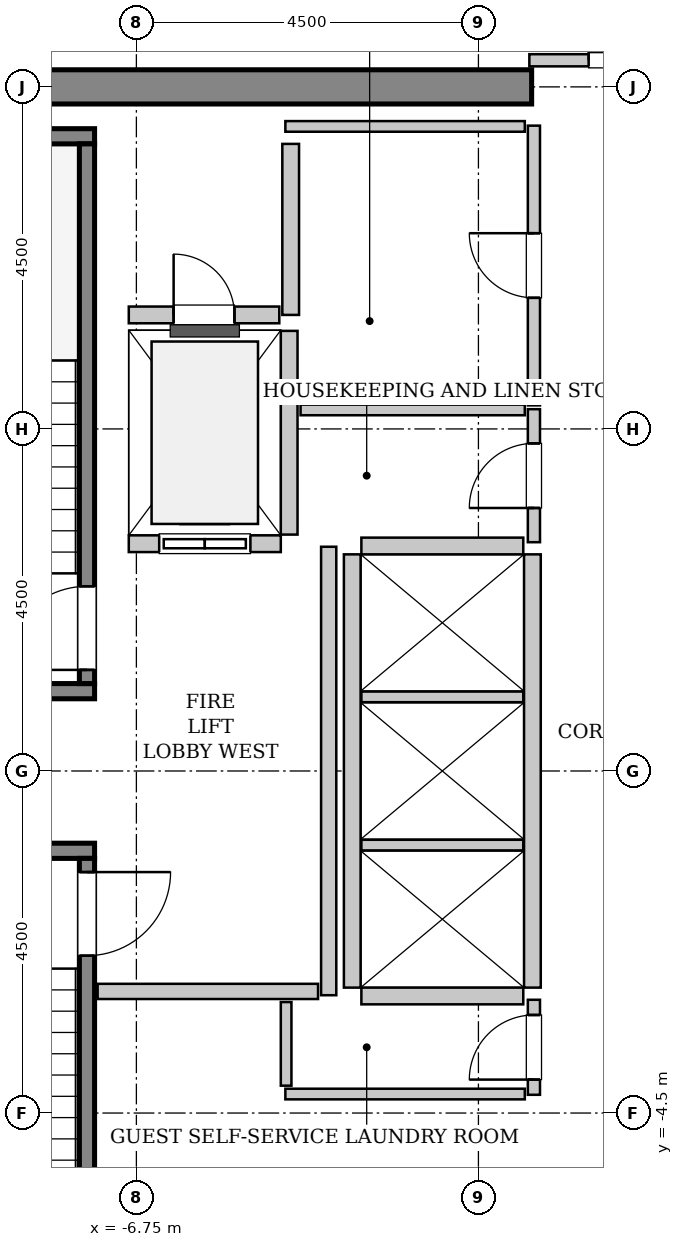
"""IFC4 building model, lengths in metres.
Left out: names, types, materials, properties, quantities, classifications, styles, units other than length and angle.
Written with IfcOpenShell. Run it as: python <this file> out.ifc"""

import sys

from ifc_helpers import new_model, si_unit, direction, frame, frame_2d, origin, place, context, subcontext, project, spatial, rectangle, extrude, source, transform, mapped, element, fill, save


model = new_model("IFC4")
c1 = context("Model", 3, precision=1e-05, world=origin(), true_north=direction((0.0, 1.0)))
c2 = subcontext(c1, "Body", "Model", "MODEL_VIEW")
j1 = project(units=[si_unit("LENGTHUNIT", "METRE"), si_unit("PLANEANGLEUNIT", "RADIAN")], contexts=[c1])
p1 = place(None, origin())
s1 = spatial("IfcSite", under=j1, at=p1, CompositionType="ELEMENT")
p2 = place(p1, origin())
s2 = spatial("IfcBuilding", under=s1, at=p2, CompositionType="ELEMENT")
p3 = place(p2, frame((0.0, 0.0, 237.0)))
s3 = spatial("IfcBuildingStorey", under=s2, at=p3, CompositionType="ELEMENT", Elevation=237.0)
m1 = source(origin(), c2, "Body", "SweptSolid", [
    extrude(rectangle(XDim=9.925, YDim=0.45, at=frame_2d((4.962, 0.0))), origin(), (0.0, 0.0, 1.0), 3.8),
])
p4 = place(p3, frame((-11.475, 9.0, 0.0), z_axis=(0.0, 0.0, 1.0), x_axis=(1.0, 0.0, 0.0)))
e1 = element("IfcWall", 1, at=p4, inside=s3, PredefinedType="SHEAR", context=c2, shape_type="MappedRepresentation", body=[
    mapped(m1, transform((0.0, 0.0, 0.0), x_axis=(1.0, 0.0, 0.0), y_axis=(0.0, 1.0, 0.0), z_axis=(0.0, 0.0, 1.0), scale=1.0)),
])
m2 = source(origin(), c2, "Body", "SweptSolid", [
    extrude(rectangle(XDim=3.4, YDim=0.2, at=frame_2d((1.7, 0.0))), origin(), (0.0, 0.0, 1.0), 3.8),
])
p5 = place(p3, frame((-7.3, 1.05, 0.0), z_axis=(0.0, 0.0, 1.0), x_axis=(-1.0, 0.0, 0.0)))
e2 = element("IfcWall", 2, at=p5, inside=s3, PredefinedType="SOLIDWALL", context=c2, shape_type="MappedRepresentation", body=[
    mapped(m2, transform((0.0, 0.0, 0.0), x_axis=(1.0, 0.0, 0.0), y_axis=(0.0, 1.0, 0.0), z_axis=(0.0, 0.0, 1.0), scale=1.0)),
])
m3 = source(origin(), c2, "Body", "SweptSolid", [
    extrude(rectangle(XDim=3.73, YDim=0.2, at=frame_2d((1.865, 0.0))), origin(), (0.0, 0.0, 1.0), 3.8),
])
p6 = place(p3, frame((-7.3, 8.35, 0.0), z_axis=(0.0, 0.0, 1.0), x_axis=(-1.0, 0.0, 0.0)))
e3 = element("IfcWall", 3, at=p6, inside=s3, PredefinedType="SOLIDWALL", context=c2, shape_type="MappedRepresentation", body=[
    mapped(m3, transform((0.0, 0.0, 0.0), x_axis=(1.0, 0.0, 0.0), y_axis=(0.0, 1.0, 0.0), z_axis=(0.0, 0.0, 1.0), scale=1.0)),
])
m4 = source(origin(), c2, "Body", "SweptSolid", [
    extrude(rectangle(XDim=7.1, YDim=0.2, at=frame_2d((3.55, 0.0))), origin(), (0.0, 0.0, 1.0), 3.8),
])
p7 = place(p3, frame((-7.4, 1.15, 0.0), z_axis=(0.0, 0.0, 1.0), x_axis=(0.0, 1.0, 0.0)))
e4 = element("IfcWall", 4, at=p7, inside=s3, PredefinedType="SOLIDWALL", context=c2, shape_type="MappedRepresentation", body=[
    mapped(m4, transform((0.0, 0.0, 0.0), x_axis=(1.0, 0.0, 0.0), y_axis=(0.0, 1.0, 0.0), z_axis=(0.0, 0.0, 1.0), scale=1.0)),
])
p8 = place(p7, frame((0.18, 0.0, 0.0)))
e5 = element("IfcOpeningElement", 5, at=p8, cuts=e4, PredefinedType="OPENING", context=c2, shape_type="SweptSolid", body=[
    extrude(rectangle(XDim=1.1, YDim=2.15, at=frame_2d((0.55, 1.075))), frame((0.0, 0.11, 0.0), z_axis=(0.0, -1.0, 0.0), x_axis=(1.0, 0.0, 0.0)), (0.0, 0.0, 1.0), 0.22),
])
p9 = place(p3, frame((-10.7, -1.05, 0.0), z_axis=(0.0, 0.0, 1.0), x_axis=(1.0, 0.0, 0.0)))
e6 = element("IfcWall", 6, at=p9, inside=s3, PredefinedType="SOLIDWALL", context=c2, shape_type="MappedRepresentation", body=[
    mapped(m2, transform((0.0, 0.0, 0.0), x_axis=(1.0, 0.0, 0.0), y_axis=(0.0, 1.0, 0.0), z_axis=(0.0, 0.0, 1.0), scale=1.0)),
])
p10 = place(p3, frame((-7.4, -1.15, 0.0), z_axis=(0.0, 0.0, 1.0), x_axis=(0.0, -1.0, 0.0)))
e7 = element("IfcWall", 7, at=p10, inside=s3, PredefinedType="SOLIDWALL", context=c2, shape_type="MappedRepresentation", body=[
    mapped(m4, transform((0.0, 0.0, 0.0), x_axis=(1.0, 0.0, 0.0), y_axis=(0.0, 1.0, 0.0), z_axis=(0.0, 0.0, 1.0), scale=1.0)),
])
p11 = place(p10, frame((0.18, 0.0, 0.0)))
e8 = element("IfcOpeningElement", 8, at=p11, cuts=e7, PredefinedType="OPENING", context=c2, shape_type="SweptSolid", body=[
    extrude(rectangle(XDim=1.1, YDim=2.15, at=frame_2d((0.55, 1.075))), frame((0.0, 0.11, 0.0), z_axis=(0.0, -1.0, 0.0), x_axis=(1.0, 0.0, 0.0)), (0.0, 0.0, 1.0), 0.22),
])
m5 = source(origin(), c2, "Body", "SweptSolid", [
    extrude(rectangle(XDim=2.0, YDim=0.22, at=frame_2d((1.0, 0.0))), origin(), (0.0, 0.0, 1.0), 3.535),
])
p12 = place(p3, frame((-6.85, 2.99, 0.0), z_axis=(0.0, 0.0, 1.0), x_axis=(1.0, 0.0, 0.0)))
e9 = element("IfcWall", 9, at=p12, inside=s3, PredefinedType="SOLIDWALL", context=c2, shape_type="MappedRepresentation", body=[
    mapped(m5, transform((0.0, 0.0, 0.0), x_axis=(1.0, 0.0, 0.0), y_axis=(0.0, 1.0, 0.0), z_axis=(0.0, 0.0, 1.0), scale=1.0)),
])
p13 = place(p12, frame((0.4, 0.0, 0.0)))
e10 = element("IfcOpeningElement", 10, at=p13, cuts=e9, PredefinedType="OPENING", context=c2, shape_type="SweptSolid", body=[
    extrude(rectangle(XDim=1.2, YDim=2.2, at=frame_2d((0.6, 1.1))), frame((0.0, 0.12, 0.0), z_axis=(0.0, -1.0, 0.0), x_axis=(1.0, 0.0, 0.0)), (0.0, 0.0, 1.0), 0.24),
])
m6 = source(origin(), c2, "Body", "SweptSolid", [
    extrude(rectangle(XDim=2.68, YDim=0.22, at=frame_2d((1.34, 0.0))), origin(), (0.0, 0.0, 1.0), 3.535),
])
p14 = place(p3, frame((-4.74, 3.11, 0.0), z_axis=(0.0, 0.0, 1.0), x_axis=(0.0, 1.0, 0.0)))
e11 = element("IfcWall", 11, at=p14, inside=s3, PredefinedType="SOLIDWALL", context=c2, shape_type="MappedRepresentation", body=[
    mapped(m6, transform((0.0, 0.0, 0.0), x_axis=(1.0, 0.0, 0.0), y_axis=(0.0, 1.0, 0.0), z_axis=(0.0, 0.0, 1.0), scale=1.0)),
])
m7 = source(origin(), c2, "Body", "SweptSolid", [
    extrude(rectangle(XDim=5.7, YDim=0.22, at=frame_2d((2.85, 0.0))), origin(), (0.0, 0.0, 1.0), 3.535),
])
for number, where, z_axis, x_axis in (
    (12, (-1.54, -2.85, 0.0), (0.0, 0.0, 1.0), (0.0, 1.0, 0.0)),
    (13, (-3.91, 2.85, 0.0), (0.0, 0.0, 1.0), (0.0, -1.0, 0.0)),
):
    element("IfcWall", number, at=place(p3, frame(where, z_axis=z_axis, x_axis=x_axis)), inside=s3, PredefinedType="SOLIDWALL", context=c2, shape_type="MappedRepresentation", body=[
        mapped(m7, transform((0.0, 0.0, 0.0), x_axis=(1.0, 0.0, 0.0), y_axis=(0.0, 1.0, 0.0), z_axis=(0.0, 0.0, 1.0), scale=1.0)),
    ])
m8 = source(origin(), c2, "Body", "SweptSolid", [
    extrude(rectangle(XDim=2.13, YDim=0.22, at=frame_2d((1.065, 0.0))), origin(), (0.0, 0.0, 1.0), 3.535),
])
p15 = place(p3, frame((-3.79, -2.96, 0.0), z_axis=(0.0, 0.0, 1.0), x_axis=(1.0, 0.0, 0.0)))
e14 = element("IfcWall", 14, at=p15, inside=s3, PredefinedType="SOLIDWALL", context=c2, shape_type="MappedRepresentation", body=[
    mapped(m8, transform((0.0, 0.0, 0.0), x_axis=(1.0, 0.0, 0.0), y_axis=(0.0, 1.0, 0.0), z_axis=(0.0, 0.0, 1.0), scale=1.0)),
])
m9 = source(origin(), c2, "Body", "SweptSolid", [
    extrude(rectangle(XDim=2.13, YDim=0.14, at=frame_2d((1.065, 0.0))), origin(), (0.0, 0.0, 1.0), 3.535),
])
for number, where, z_axis, x_axis in (
    (15, (-3.79, -0.975, 0.0), (0.0, 0.0, 1.0), (1.0, 0.0, 0.0)),
    (16, (-3.79, 0.975, 0.0), (0.0, 0.0, 1.0), (1.0, 0.0, 0.0)),
):
    element("IfcWall", number, at=place(p3, frame(where, z_axis=z_axis, x_axis=x_axis)), inside=s3, PredefinedType="PARTITIONING", context=c2, shape_type="MappedRepresentation", body=[
        mapped(m9, transform((0.0, 0.0, 0.0), x_axis=(1.0, 0.0, 0.0), y_axis=(0.0, 1.0, 0.0), z_axis=(0.0, 0.0, 1.0), scale=1.0)),
    ])
p16 = place(p3, frame((-1.66, 2.96, 0.0), z_axis=(0.0, 0.0, 1.0), x_axis=(-1.0, 0.0, 0.0)))
e17 = element("IfcWall", 17, at=p16, inside=s3, PredefinedType="SOLIDWALL", context=c2, shape_type="MappedRepresentation", body=[
    mapped(m8, transform((0.0, 0.0, 0.0), x_axis=(1.0, 0.0, 0.0), y_axis=(0.0, 1.0, 0.0), z_axis=(0.0, 0.0, 1.0), scale=1.0)),
])
m10 = source(origin(), c2, "Body", "SweptSolid", [
    extrude(rectangle(XDim=2.25, YDim=0.22, at=frame_2d((1.125, 0.0))), origin(), (0.0, 0.0, 1.0), 3.535),
])
p17 = place(p3, frame((-4.72, 6.0, 0.0), z_axis=(0.0, 0.0, 1.0), x_axis=(0.0, 1.0, 0.0)))
e18 = element("IfcWall", 18, at=p17, inside=s3, PredefinedType="SOLIDWALL", context=c2, shape_type="MappedRepresentation", body=[
    mapped(m10, transform((0.0, 0.0, 0.0), x_axis=(1.0, 0.0, 0.0), y_axis=(0.0, 1.0, 0.0), z_axis=(0.0, 0.0, 1.0), scale=1.0)),
])
m11 = source(origin(), c2, "Body", "SweptSolid", [
    extrude(rectangle(XDim=1.98, YDim=0.22, at=frame_2d((0.99, 0.0))), origin(), (0.0, 0.0, 1.0), 3.535),
])
p18 = place(p3, frame((-6.85, 6.0, 0.0), z_axis=(0.0, 0.0, 1.0), x_axis=(1.0, 0.0, 0.0)))
e19 = element("IfcWall", 19, at=p18, inside=s3, PredefinedType="SOLIDWALL", context=c2, shape_type="MappedRepresentation", body=[
    mapped(m11, transform((0.0, 0.0, 0.0), x_axis=(1.0, 0.0, 0.0), y_axis=(0.0, 1.0, 0.0), z_axis=(0.0, 0.0, 1.0), scale=1.0)),
])
p19 = place(p18, frame((0.59, 0.0, 0.0)))
e20 = element("IfcOpeningElement", 20, at=p19, cuts=e19, PredefinedType="OPENING", context=c2, shape_type="SweptSolid", body=[
    extrude(rectangle(XDim=0.8, YDim=2.0, at=frame_2d((0.4, 1.0))), frame((0.0, 0.12, 0.0), z_axis=(0.0, -1.0, 0.0), x_axis=(1.0, 0.0, 0.0)), (0.0, 0.0, 1.0), 0.24),
])
m12 = source(origin(), c2, "Body", "SweptSolid", [
    extrude(rectangle(XDim=5.9, YDim=0.2, at=frame_2d((2.95, 0.0))), origin(), (0.0, 0.0, 1.0), 3.535),
])
p20 = place(p3, frame((-4.22, -2.95, 0.0), z_axis=(0.0, 0.0, 1.0), x_axis=(0.0, 1.0, 0.0)))
e21 = element("IfcWall", 21, at=p20, inside=s3, PredefinedType="PARTITIONING", context=c2, shape_type="MappedRepresentation", body=[
    mapped(m12, transform((0.0, 0.0, 0.0), x_axis=(1.0, 0.0, 0.0), y_axis=(0.0, 1.0, 0.0), z_axis=(0.0, 0.0, 1.0), scale=1.0)),
])
m13 = source(origin(), c2, "Body", "SweptSolid", [
    extrude(rectangle(XDim=2.9, YDim=0.2, at=frame_2d((1.45, 0.0))), origin(), (0.0, 0.0, 1.0), 3.535),
])
p21 = place(p3, frame((-7.26, -2.9, 0.0), z_axis=(0.0, 0.0, 1.0), x_axis=(1.0, 0.0, 0.0)))
e22 = element("IfcWall", 22, at=p21, inside=s3, PredefinedType="PARTITIONING", context=c2, shape_type="MappedRepresentation", body=[
    mapped(m13, transform((0.0, 0.0, 0.0), x_axis=(1.0, 0.0, 0.0), y_axis=(0.0, 1.0, 0.0), z_axis=(0.0, 0.0, 1.0), scale=1.0)),
])
m14 = source(origin(), c2, "Body", "SweptSolid", [
    extrude(rectangle(XDim=3.16, YDim=0.16, at=frame_2d((1.58, 0.0))), origin(), (0.0, 0.0, 1.0), 2.625),
])
p22 = place(p3, frame((-1.58, 9.35, 0.0), z_axis=(0.0, 0.0, 1.0), x_axis=(1.0, 0.0, 0.0)))
e23 = element("IfcWall", 23, at=p22, inside=s3, PredefinedType="PARTITIONING", context=c2, shape_type="MappedRepresentation", body=[
    mapped(m14, transform((0.0, 0.0, 0.0), x_axis=(1.0, 0.0, 0.0), y_axis=(0.0, 1.0, 0.0), z_axis=(0.0, 0.0, 1.0), scale=1.0)),
])
p23 = place(p22, frame((0.78, 0.0, 0.0)))
e24 = element("IfcOpeningElement", 24, at=p23, cuts=e23, PredefinedType="OPENING", context=c2, shape_type="SweptSolid", body=[
    extrude(rectangle(XDim=1.6, YDim=2.3, at=frame_2d((0.8, 1.15))), frame((0.0, 0.09, 0.0), z_axis=(0.0, -1.0, 0.0), x_axis=(1.0, 0.0, 0.0)), (0.0, 0.0, 1.0), 0.18),
])
m15 = source(origin(), c2, "Body", "SweptSolid", [
    extrude(rectangle(XDim=1.75, YDim=0.16, at=frame_2d((0.875, 0.0))), origin(), (0.0, 0.0, 1.0), 3.535),
])
p24 = place(p3, frame((-1.52, 3.01, 0.0), z_axis=(0.0, 0.0, 1.0), x_axis=(0.0, 1.0, 0.0)))
e25 = element("IfcWall", 25, at=p24, inside=s3, PredefinedType="PARTITIONING", context=c2, shape_type="MappedRepresentation", body=[
    mapped(m15, transform((0.0, 0.0, 0.0), x_axis=(1.0, 0.0, 0.0), y_axis=(0.0, 1.0, 0.0), z_axis=(0.0, 0.0, 1.0), scale=1.0)),
])
p25 = place(p24, frame((0.45, 0.0, 0.0)))
e26 = element("IfcOpeningElement", 26, at=p25, cuts=e25, PredefinedType="OPENING", context=c2, shape_type="SweptSolid", body=[
    extrude(rectangle(XDim=0.85, YDim=2.1, at=frame_2d((0.425, 1.05))), frame((0.0, 0.09, 0.0), z_axis=(0.0, -1.0, 0.0), x_axis=(1.0, 0.0, 0.0)), (0.0, 0.0, 1.0), 0.18),
])
m16 = source(origin(), c2, "Body", "SweptSolid", [
    extrude(rectangle(XDim=2.95, YDim=0.14, at=frame_2d((1.475, 0.0))), origin(), (0.0, 0.0, 1.0), 3.535),
])
p26 = place(p3, frame((-4.59, 4.75, 0.0), z_axis=(0.0, 0.0, 1.0), x_axis=(1.0, 0.0, 0.0)))
e27 = element("IfcWall", 27, at=p26, inside=s3, PredefinedType="PARTITIONING", context=c2, shape_type="MappedRepresentation", body=[
    mapped(m16, transform((0.0, 0.0, 0.0), x_axis=(1.0, 0.0, 0.0), y_axis=(0.0, 1.0, 0.0), z_axis=(0.0, 0.0, 1.0), scale=1.0)),
])
m17 = source(origin(), c2, "Body", "SweptSolid", [
    extrude(rectangle(XDim=3.68, YDim=0.16, at=frame_2d((1.84, 0.0))), origin(), (0.0, 0.0, 1.0), 3.535),
])
p27 = place(p3, frame((-1.52, 4.81, 0.0), z_axis=(0.0, 0.0, 1.0), x_axis=(0.0, 1.0, 0.0)))
e28 = element("IfcWall", 28, at=p27, inside=s3, PredefinedType="PARTITIONING", context=c2, shape_type="MappedRepresentation", body=[
    mapped(m17, transform((0.0, 0.0, 0.0), x_axis=(1.0, 0.0, 0.0), y_axis=(0.0, 1.0, 0.0), z_axis=(0.0, 0.0, 1.0), scale=1.0)),
])
p28 = place(p27, frame((1.415, 0.0, 0.0)))
e29 = element("IfcOpeningElement", 29, at=p28, cuts=e28, PredefinedType="OPENING", context=c2, shape_type="SweptSolid", body=[
    extrude(rectangle(XDim=0.85, YDim=2.1, at=frame_2d((0.425, 1.05))), frame((0.0, 0.09, 0.0), z_axis=(0.0, -1.0, 0.0), x_axis=(1.0, 0.0, 0.0)), (0.0, 0.0, 1.0), 0.18),
])
m18 = source(origin(), c2, "Body", "SweptSolid", [
    extrude(rectangle(XDim=3.15, YDim=0.14, at=frame_2d((1.575, 0.0))), origin(), (0.0, 0.0, 1.0), 3.535),
])
p29 = place(p3, frame((-4.79, 8.48, 0.0), z_axis=(0.0, 0.0, 1.0), x_axis=(1.0, 0.0, 0.0)))
e30 = element("IfcWall", 30, at=p29, inside=s3, PredefinedType="PARTITIONING", context=c2, shape_type="MappedRepresentation", body=[
    mapped(m18, transform((0.0, 0.0, 0.0), x_axis=(1.0, 0.0, 0.0), y_axis=(0.0, 1.0, 0.0), z_axis=(0.0, 0.0, 1.0), scale=1.0)),
])
m19 = source(origin(), c2, "Body", "SweptSolid", [
    extrude(rectangle(XDim=1.25, YDim=0.16, at=frame_2d((0.625, 0.0))), origin(), (0.0, 0.0, 1.0), 3.535),
])
p30 = place(p3, frame((-1.52, -4.26, 0.0), z_axis=(0.0, 0.0, 1.0), x_axis=(0.0, 1.0, 0.0)))
e31 = element("IfcWall", 31, at=p30, inside=s3, PredefinedType="PARTITIONING", context=c2, shape_type="MappedRepresentation", body=[
    mapped(m19, transform((0.0, 0.0, 0.0), x_axis=(1.0, 0.0, 0.0), y_axis=(0.0, 1.0, 0.0), z_axis=(0.0, 0.0, 1.0), scale=1.0)),
])
p31 = place(p30, frame((0.2, 0.0, 0.0)))
e32 = element("IfcOpeningElement", 32, at=p31, cuts=e31, PredefinedType="OPENING", context=c2, shape_type="SweptSolid", body=[
    extrude(rectangle(XDim=0.85, YDim=2.1, at=frame_2d((0.425, 1.05))), frame((0.0, 0.09, 0.0), z_axis=(0.0, -1.0, 0.0), x_axis=(1.0, 0.0, 0.0)), (0.0, 0.0, 1.0), 0.18),
])
p32 = place(p3, frame((-4.79, -4.25, 0.0), z_axis=(0.0, 0.0, 1.0), x_axis=(1.0, 0.0, 0.0)))
e33 = element("IfcWall", 33, at=p32, inside=s3, PredefinedType="PARTITIONING", context=c2, shape_type="MappedRepresentation", body=[
    mapped(m18, transform((0.0, 0.0, 0.0), x_axis=(1.0, 0.0, 0.0), y_axis=(0.0, 1.0, 0.0), z_axis=(0.0, 0.0, 1.0), scale=1.0)),
])
m20 = source(origin(), c2, "Body", "SweptSolid", [
    extrude(rectangle(XDim=1.1, YDim=0.14, at=frame_2d((0.55, 0.0))), origin(), (0.0, 0.0, 1.0), 3.535),
])
p33 = place(p3, frame((-4.78, -4.14, 0.0), z_axis=(0.0, 0.0, 1.0), x_axis=(0.0, 1.0, 0.0)))
e34 = element("IfcWall", 34, at=p33, inside=s3, PredefinedType="PARTITIONING", context=c2, shape_type="MappedRepresentation", body=[
    mapped(m20, transform((0.0, 0.0, 0.0), x_axis=(1.0, 0.0, 0.0), y_axis=(0.0, 1.0, 0.0), z_axis=(0.0, 0.0, 1.0), scale=1.0)),
])
m21 = source(origin(), c2, "Body", "SweptSolid", [
    extrude(rectangle(XDim=1.1, YDim=2.15, at=frame_2d((0.55, 1.075))), frame((0.0, 0.025, 0.0), z_axis=(0.0, -1.0, 0.0), x_axis=(1.0, 0.0, 0.0)), (0.0, 0.0, 1.0), 0.05),
])
p34 = place(p8, origin())
e35 = element("IfcDoor", 35, at=p34, inside=s3, OperationType="SINGLE_SWING_LEFT", PredefinedType="DOOR", context=c2, shape_type="MappedRepresentation", body=[
    mapped(m21, transform((0.0, 0.0, 0.0), x_axis=(1.0, 0.0, 0.0), y_axis=(0.0, 1.0, 0.0), z_axis=(0.0, 0.0, 1.0), scale=1.0)),
])
fill(e5, e35)
p35 = place(p11, origin())
e36 = element("IfcDoor", 36, at=p35, inside=s3, OperationType="SINGLE_SWING_LEFT", PredefinedType="DOOR", context=c2, shape_type="MappedRepresentation", body=[
    mapped(m21, transform((0.0, 0.0, 0.0), x_axis=(1.0, 0.0, 0.0), y_axis=(0.0, 1.0, 0.0), z_axis=(0.0, 0.0, 1.0), scale=1.0)),
])
fill(e8, e36)
m22 = source(origin(), c2, "Body", "SweptSolid", [
    extrude(rectangle(XDim=1.2, YDim=2.2, at=frame_2d((0.6, 1.1))), frame((0.0, 0.025, 0.0), z_axis=(0.0, -1.0, 0.0), x_axis=(1.0, 0.0, 0.0)), (0.0, 0.0, 1.0), 0.05),
])
p36 = place(p13, origin())
e37 = element("IfcDoor", 37, at=p36, inside=s3, OperationType="SLIDING_TO_LEFT", PredefinedType="DOOR", context=c2, shape_type="MappedRepresentation", body=[
    mapped(m22, transform((0.0, 0.0, 0.0), x_axis=(1.0, 0.0, 0.0), y_axis=(0.0, 1.0, 0.0), z_axis=(0.0, 0.0, 1.0), scale=1.0)),
])
fill(e10, e37)
m23 = source(origin(), c2, "Body", "SweptSolid", [
    extrude(rectangle(XDim=0.8, YDim=2.0, at=frame_2d((0.4, 1.0))), frame((0.0, 0.025, 0.0), z_axis=(0.0, -1.0, 0.0), x_axis=(1.0, 0.0, 0.0)), (0.0, 0.0, 1.0), 0.05),
])
p37 = place(p19, origin())
e38 = element("IfcDoor", 38, at=p37, inside=s3, OperationType="SINGLE_SWING_LEFT", PredefinedType="TRAPDOOR", context=c2, shape_type="MappedRepresentation", body=[
    mapped(m23, transform((0.0, 0.0, 0.0), x_axis=(1.0, 0.0, 0.0), y_axis=(0.0, 1.0, 0.0), z_axis=(0.0, 0.0, 1.0), scale=1.0)),
])
fill(e20, e38)
m24 = source(origin(), c2, "Body", "SweptSolid", [
    extrude(rectangle(XDim=1.6, YDim=2.3, at=frame_2d((0.8, 1.15))), frame((0.0, 0.025, 0.0), z_axis=(0.0, -1.0, 0.0), x_axis=(1.0, 0.0, 0.0)), (0.0, 0.0, 1.0), 0.05),
])
p38 = place(p23, origin())
e39 = element("IfcDoor", 39, at=p38, inside=s3, OperationType="DOUBLE_DOOR_SINGLE_SWING", PredefinedType="DOOR", context=c2, shape_type="MappedRepresentation", body=[
    mapped(m24, transform((0.0, 0.0, 0.0), x_axis=(1.0, 0.0, 0.0), y_axis=(0.0, 1.0, 0.0), z_axis=(0.0, 0.0, 1.0), scale=1.0)),
])
fill(e24, e39)
m25 = source(origin(), c2, "Body", "SweptSolid", [
    extrude(rectangle(XDim=0.85, YDim=2.1, at=frame_2d((0.425, 1.05))), frame((0.0, 0.025, 0.0), z_axis=(0.0, -1.0, 0.0), x_axis=(1.0, 0.0, 0.0)), (0.0, 0.0, 1.0), 0.05),
])
p39 = place(p25, origin())
e40 = element("IfcDoor", 40, at=p39, inside=s3, OperationType="SINGLE_SWING_LEFT", PredefinedType="DOOR", context=c2, shape_type="MappedRepresentation", body=[
    mapped(m25, transform((0.0, 0.0, 0.0), x_axis=(1.0, 0.0, 0.0), y_axis=(0.0, 1.0, 0.0), z_axis=(0.0, 0.0, 1.0), scale=1.0)),
])
fill(e26, e40)
p40 = place(p28, origin())
e41 = element("IfcDoor", 41, at=p40, inside=s3, OperationType="SINGLE_SWING_RIGHT", PredefinedType="DOOR", context=c2, shape_type="MappedRepresentation", body=[
    mapped(m25, transform((0.0, 0.0, 0.0), x_axis=(1.0, 0.0, 0.0), y_axis=(0.0, 1.0, 0.0), z_axis=(0.0, 0.0, 1.0), scale=1.0)),
])
fill(e29, e41)
p41 = place(p31, origin())
e42 = element("IfcDoor", 42, at=p41, inside=s3, OperationType="SINGLE_SWING_LEFT", PredefinedType="DOOR", context=c2, shape_type="MappedRepresentation", body=[
    mapped(m25, transform((0.0, 0.0, 0.0), x_axis=(1.0, 0.0, 0.0), y_axis=(0.0, 1.0, 0.0), z_axis=(0.0, 0.0, 1.0), scale=1.0)),
])
fill(e32, e42)
save(model, sys.argv[1])
